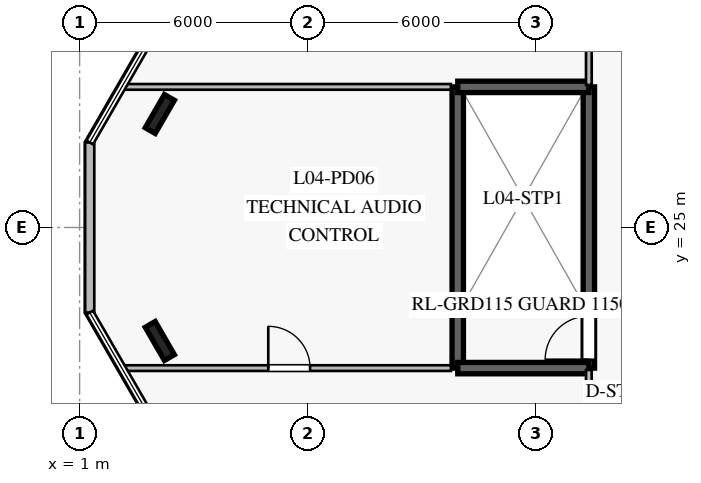
"""IFC4 building model, lengths in metres.
Left out: names, types, materials, properties, quantities, classifications, styles, units other than length and angle.
Written with IfcOpenShell. Run it as: python <this file> out.ifc"""

import sys

from ifc_helpers import new_model, si_unit, direction, frame, frame_2d, origin, origin_2d, place, context, subcontext, project, spatial, rectangle, i_section, extrude, element, fill, save


model = new_model("IFC4")
c1 = context("Model", 3, precision=1e-05, world=origin(), true_north=direction((0.0, 1.0)))
c2 = subcontext(c1, "Body", "Model", "MODEL_VIEW")
j1 = project(units=[si_unit("LENGTHUNIT", "METRE"), si_unit("PLANEANGLEUNIT", "RADIAN")], contexts=[c1])
p1 = place(None, origin())
s1 = spatial("IfcSite", under=j1, at=p1, CompositionType="ELEMENT")
p2 = place(p1, origin())
s2 = spatial("IfcBuilding", under=s1, at=p2, CompositionType="ELEMENT")
p3 = place(p2, frame((0.0, 0.0, 19.0)))
s3 = spatial("IfcBuildingStorey", under=s2, at=p3, CompositionType="ELEMENT", Elevation=19.0)
p4 = place(p3, frame((14.4, 21.3, 0.0), z_axis=(0.0, 0.0, 1.0), x_axis=(0.0, 1.0, 0.0)))
e1 = element("IfcWall", 1, at=p4, inside=s3, PredefinedType="SOLIDWALL", context=c2, shape_type="SweptSolid", body=[
    extrude(rectangle(XDim=7.4, YDim=0.3, at=frame_2d((3.7, 0.0))), origin(), (0.0, 0.0, 1.0), 4.76),
])
p5 = place(p4, frame((0.22, 0.0, 0.0)))
e2 = element("IfcOpeningElement", 2, at=p5, cuts=e1, PredefinedType="OPENING", context=c2, shape_type="SweptSolid", body=[
    extrude(rectangle(XDim=1.15, YDim=2.2, at=frame_2d((0.575, 1.1))), frame((0.0, 0.16, 0.0), z_axis=(0.0, -1.0, 0.0), x_axis=(1.0, 0.0, 0.0)), (0.0, 0.0, 1.0), 0.32),
])
p6 = place(p3, frame((10.95, 21.3, 0.0), z_axis=(0.0, 0.0, 1.0), x_axis=(0.0, 1.0, 0.0)))
e3 = element("IfcWall", 3, at=p6, inside=s3, PredefinedType="SOLIDWALL", context=c2, shape_type="SweptSolid", body=[
    extrude(rectangle(XDim=7.4, YDim=0.3, at=frame_2d((3.7, 0.0))), origin(), (0.0, 0.0, 1.0), 4.76),
])
for number, where, z_axis, x_axis in (
    (4, (10.95, 21.3, 0.0), (0.0, 0.0, 1.0), (1.0, 0.0, 0.0)),
    (5, (10.95, 28.7, 0.0), (0.0, 0.0, 1.0), (1.0, 0.0, 0.0)),
):
    element("IfcWall", number, at=place(p3, frame(where, z_axis=z_axis, x_axis=x_axis)), inside=s3, PredefinedType="SOLIDWALL", context=c2, shape_type="SweptSolid", body=[
        extrude(rectangle(XDim=3.45, YDim=0.3, at=frame_2d((1.725, 0.0))), origin(), (0.0, 0.0, 1.0), 4.76),
    ])
for number, where, z_axis, x_axis in (
    (6, (3.11, 27.986, 0.0), (0.0, 0.0, 1.0), (0.5, 0.866, 0.0)),
    (7, (3.11, 22.014, 0.0), (0.0, 0.0, 1.0), (-0.5, 0.866, 0.0)),
):
    element("IfcColumn", number, at=place(p3, frame(where, z_axis=z_axis, x_axis=x_axis)), inside=s3, PredefinedType="COLUMN", context=c2, shape_type="SweptSolid", body=[
        extrude(i_section(OverallWidth=0.302, OverallDepth=1.008, WebThickness=0.021, FlangeThickness=0.04, at=origin_2d()), origin(), (0.0, 0.0, 1.0), 5.0),
    ])
p7 = place(p3, frame((1.266, 27.237, 0.0), z_axis=(0.0, 0.0, 1.0), x_axis=(0.0, -1.0, 0.0)))
e8 = element("IfcWall", 8, at=p7, inside=s3, PredefinedType="STANDARD", context=c2, shape_type="SweptSolid", body=[
    extrude(rectangle(XDim=4.474, YDim=0.24, at=frame_2d((2.237, 0.0))), origin(), (0.0, 0.0, 1.0), 4.76),
])
for number, where, z_axis, x_axis in (
    (9, (14.4, 15.0, 0.0), (0.0, 0.0, 1.0), (0.0, 1.0, 0.0)),
    (10, (14.4, 28.75, 0.0), (0.0, 0.0, 1.0), (0.0, 1.0, 0.0)),
):
    element("IfcWall", number, at=place(p3, frame(where, z_axis=z_axis, x_axis=x_axis)), inside=s3, PredefinedType="PARTITIONING", context=c2, shape_type="SweptSolid", body=[
        extrude(rectangle(XDim=6.25, YDim=0.15, at=frame_2d((3.125, 0.0))), origin(), (0.0, 0.0, 1.0), 2.76),
    ])
p8 = place(p3, frame((2.08, 21.3, 0.0), z_axis=(0.0, 0.0, 1.0), x_axis=(1.0, 0.0, 0.0)))
e11 = element("IfcWall", 11, at=p8, inside=s3, PredefinedType="PARTITIONING", context=c2, shape_type="SweptSolid", body=[
    extrude(rectangle(XDim=8.69, YDim=0.15, at=frame_2d((4.345, 0.0))), origin(), (0.0, 0.0, 1.0), 2.76),
])
p9 = place(p8, frame((3.884, 0.0, 0.0)))
e12 = element("IfcOpeningElement", 12, at=p9, cuts=e11, PredefinedType="OPENING", context=c2, shape_type="SweptSolid", body=[
    extrude(rectangle(XDim=1.1, YDim=2.2, at=frame_2d((0.55, 1.1))), frame((0.0, 0.085, 0.0), z_axis=(0.0, -1.0, 0.0), x_axis=(1.0, 0.0, 0.0)), (0.0, 0.0, 1.0), 0.17),
])
p10 = place(p3, frame((2.08, 28.7, 0.0), z_axis=(0.0, 0.0, 1.0), x_axis=(1.0, 0.0, 0.0)))
e13 = element("IfcWall", 13, at=p10, inside=s3, PredefinedType="PARTITIONING", context=c2, shape_type="SweptSolid", body=[
    extrude(rectangle(XDim=8.69, YDim=0.15, at=frame_2d((4.345, 0.0))), origin(), (0.0, 0.0, 1.0), 2.76),
])
p11 = place(p5, origin())
e14 = element("IfcDoor", 14, at=p11, inside=s3, OperationType="SINGLE_SWING_LEFT", PredefinedType="DOOR", context=c2, shape_type="SweptSolid", body=[
    extrude(rectangle(XDim=1.15, YDim=2.2, at=frame_2d((0.575, 1.1))), frame((0.0, 0.025, 0.0), z_axis=(0.0, -1.0, 0.0), x_axis=(1.0, 0.0, 0.0)), (0.0, 0.0, 1.0), 0.05),
])
fill(e2, e14)
p12 = place(p9, origin())
e15 = element("IfcDoor", 15, at=p12, inside=s3, OperationType="SINGLE_SWING_LEFT", PredefinedType="DOOR", context=c2, shape_type="SweptSolid", body=[
    extrude(rectangle(XDim=1.1, YDim=2.2, at=frame_2d((0.55, 1.1))), frame((0.0, 0.025, 0.0), z_axis=(0.0, -1.0, 0.0), x_axis=(1.0, 0.0, 0.0)), (0.0, 0.0, 1.0), 0.05),
])
fill(e12, e15)
save(model, sys.argv[1])
